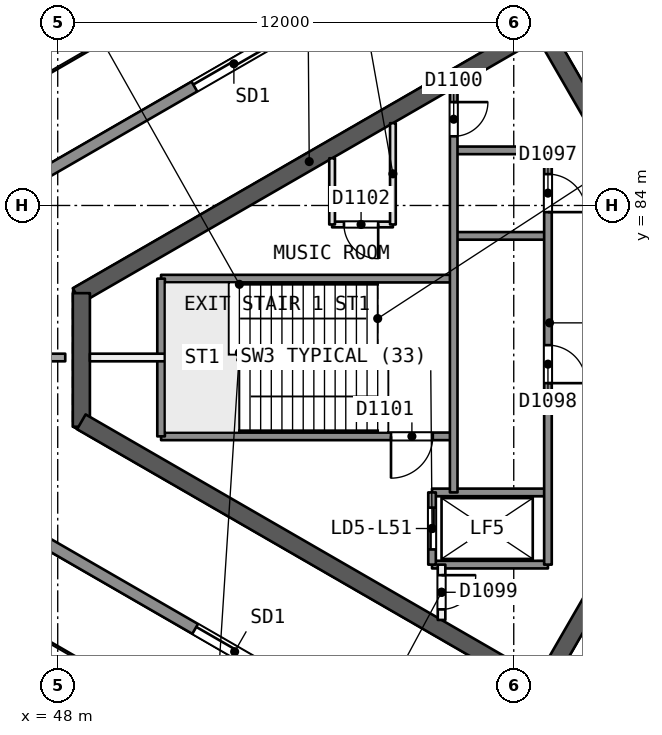
"""IFC4 building model, lengths in metres.
Left out: names, types, materials, properties, quantities, classifications, styles, units other than length and angle.
Written with IfcOpenShell. Run it as: python <this file> out.ifc"""

import sys

from ifc_helpers import new_model, si_unit, direction, frame, frame_2d, origin, place, context, subcontext, project, spatial, rectangle, extrude, element, fill, save


model = new_model("IFC4")
c1 = context("Model", 3, precision=1e-05, world=origin(), true_north=direction((0.0, 1.0)))
c2 = subcontext(c1, "Body", "Model", "MODEL_VIEW")
j1 = project(units=[si_unit("LENGTHUNIT", "METRE"), si_unit("PLANEANGLEUNIT", "RADIAN")], contexts=[c1])
p1 = place(None, origin())
s1 = spatial("IfcSite", under=j1, at=p1, CompositionType="ELEMENT")
p2 = place(p1, origin())
s2 = spatial("IfcBuilding", under=s1, at=p2, CompositionType="ELEMENT")
p3 = place(p2, frame((0.0, 0.0, 209.5)))
s3 = spatial("IfcBuildingStorey", under=s2, at=p3, CompositionType="ELEMENT", Elevation=209.5)
p4 = place(p3, frame((65.74, 80.0, 0.0), z_axis=(0.0, 0.0, 1.0), x_axis=(-0.499991857942, 0.866030104553, 0.0)))
e1 = element("IfcWall", 1, at=p4, inside=s3, PredefinedType="SHEAR", context=c2, shape_type="SweptSolid", body=[
    extrude(rectangle(XDim=10.25, YDim=0.45, at=frame_2d((5.125, 0.0))), origin(), (0.0, 0.0, 1.0), 3.7),
])
p5 = place(p4, frame((0.82, 0.0, 0.0)))
e2 = element("IfcOpeningElement", 2, at=p5, cuts=e1, PredefinedType="OPENING", context=c2, shape_type="SweptSolid", body=[
    extrude(rectangle(XDim=1.2, YDim=2.1, at=frame_2d((0.6, 1.05))), frame((0.0, 0.235, 0.0), z_axis=(0.0, -1.0, 0.0), x_axis=(1.0, 0.0, 0.0)), (0.0, 0.0, 1.0), 0.471),
])
p6 = place(p3, frame((60.728, 88.682, 0.0), z_axis=(0.0, 0.0, 1.0), x_axis=(-0.866021613849, -0.500006564303, 0.0)))
e3 = element("IfcWall", 3, at=p6, inside=s3, PredefinedType="SHEAR", context=c2, shape_type="SweptSolid", body=[
    extrude(rectangle(XDim=14.108, YDim=0.45, at=frame_2d((7.054, 0.0))), origin(), (0.0, 0.0, 1.0), 3.7),
])
p7 = place(p3, frame((48.622, 81.693, 0.0), z_axis=(0.0, 0.0, 1.0), x_axis=(0.0, -1.0, 0.0)))
e4 = element("IfcWall", 4, at=p7, inside=s3, PredefinedType="SHEAR", context=c2, shape_type="SweptSolid", body=[
    extrude(rectangle(XDim=3.515, YDim=0.45, at=frame_2d((1.758, 0.0))), origin(), (0.0, 0.0, 1.0), 3.7),
])
p8 = place(p3, frame((48.622, 78.307, 0.0), z_axis=(0.0, 0.0, 1.0), x_axis=(0.86602701116, -0.499997215934, 0.0)))
e5 = element("IfcWall", 5, at=p8, inside=s3, PredefinedType="SHEAR", context=c2, shape_type="SweptSolid", body=[
    extrude(rectangle(XDim=14.204, YDim=0.45, at=frame_2d((7.102, 0.0))), origin(), (0.0, 0.0, 1.0), 3.7),
])
p9 = place(p3, frame((60.728, 71.318, 0.0), z_axis=(0.0, 0.0, 1.0), x_axis=(0.500012416173, 0.866018235185, 0.0)))
e6 = element("IfcWall", 6, at=p9, inside=s3, PredefinedType="SHEAR", context=c2, shape_type="SweptSolid", body=[
    extrude(rectangle(XDim=10.155, YDim=0.45, at=frame_2d((5.078, 0.0))), origin(), (0.0, 0.0, 1.0), 3.7),
])
p10 = place(p9, frame((8.005, 0.0, 0.0)))
e7 = element("IfcOpeningElement", 7, at=p10, cuts=e6, PredefinedType="OPENING", context=c2, shape_type="SweptSolid", body=[
    extrude(rectangle(XDim=1.2, YDim=2.1, at=frame_2d((0.6, 1.05))), frame((0.0, 0.235, 0.0), z_axis=(0.0, -1.0, 0.0), x_axis=(1.0, 0.0, 0.0)), (0.0, 0.0, 1.0), 0.471),
])
p11 = place(p3, frame((43.951, 80.0, 0.0), z_axis=(0.0, 0.0, 1.0), x_axis=(1.0, 0.0, 0.0)))
e8 = element("IfcWall", 8, at=p11, inside=s3, PredefinedType="PARTITIONING", context=c2, shape_type="SweptSolid", body=[
    extrude(rectangle(XDim=4.247, YDim=0.2, at=frame_2d((2.123, 0.0))), origin(), (0.0, 0.0, 1.0), 3.3),
])
p12 = place(p3, frame((43.802, 82.63, 0.0), z_axis=(0.0, 0.0, 1.0), x_axis=(0.866026224187, 0.499998579018, 0.0)))
e9 = element("IfcWall", 9, at=p12, inside=s3, PredefinedType="SOLIDWALL", context=c2, shape_type="SweptSolid", body=[
    extrude(rectangle(XDim=51.406, YDim=0.3, at=frame_2d((25.703, 0.0))), origin(), (0.0, 0.0, 1.0), 3.3),
])
p13 = place(p12, frame((24.503, 0.0, 0.0)))
e10 = element("IfcOpeningElement", 10, at=p13, cuts=e9, PredefinedType="OPENING", context=c2, shape_type="SweptSolid", body=[
    extrude(rectangle(XDim=2.4, YDim=2.4, at=frame_2d((1.2, 1.2))), frame((0.0, 0.161, 0.0), z_axis=(0.0, -1.0, 0.0), x_axis=(1.0, 0.0, 0.0)), (0.0, 0.0, 1.0), 0.321),
])
p14 = place(p12, frame((30.271, 0.0, 0.0)))
e11 = element("IfcOpeningElement", 11, at=p14, cuts=e9, PredefinedType="OPENING", context=c2, shape_type="SweptSolid", body=[
    extrude(rectangle(XDim=2.4, YDim=2.4, at=frame_2d((1.2, 1.2))), frame((0.0, 0.161, 0.0), z_axis=(0.0, -1.0, 0.0), x_axis=(1.0, 0.0, 0.0)), (0.0, 0.0, 1.0), 0.321),
])
p15 = place(p12, frame((39.983, 0.0, 0.0)))
e12 = element("IfcOpeningElement", 12, at=p15, cuts=e9, PredefinedType="OPENING", context=c2, shape_type="SweptSolid", body=[
    extrude(rectangle(XDim=2.4, YDim=2.4, at=frame_2d((1.2, 1.2))), frame((0.0, 0.161, 0.0), z_axis=(0.0, -1.0, 0.0), x_axis=(1.0, 0.0, 0.0)), (0.0, 0.0, 1.0), 0.321),
])
p16 = place(p12, frame((18.736, 0.0, 0.0)))
e13 = element("IfcOpeningElement", 13, at=p16, cuts=e9, PredefinedType="OPENING", context=c2, shape_type="SweptSolid", body=[
    extrude(rectangle(XDim=2.4, YDim=2.4, at=frame_2d((1.2, 1.2))), frame((0.0, 0.161, 0.0), z_axis=(0.0, -1.0, 0.0), x_axis=(1.0, 0.0, 0.0)), (0.0, 0.0, 1.0), 0.321),
])
p17 = place(p12, frame((9.0, 0.0, 0.0)))
e14 = element("IfcOpeningElement", 14, at=p17, cuts=e9, PredefinedType="OPENING", context=c2, shape_type="SweptSolid", body=[
    extrude(rectangle(XDim=2.4, YDim=2.4, at=frame_2d((1.2, 1.2))), frame((0.0, 0.161, 0.0), z_axis=(0.0, -1.0, 0.0), x_axis=(1.0, 0.0, 0.0)), (0.0, 0.0, 1.0), 0.321),
])
p18 = place(p3, frame((88.322, 51.667, 0.0), z_axis=(0.0, 0.0, 1.0), x_axis=(-0.866026224187, 0.499998579018, 0.0)))
e15 = element("IfcWall", 15, at=p18, inside=s3, PredefinedType="SOLIDWALL", context=c2, shape_type="SweptSolid", body=[
    extrude(rectangle(XDim=51.406, YDim=0.3, at=frame_2d((25.703, 0.0))), origin(), (0.0, 0.0, 1.0), 3.3),
])
p19 = place(p18, frame((29.803, 0.0, 0.0)))
e16 = element("IfcOpeningElement", 16, at=p19, cuts=e15, PredefinedType="OPENING", context=c2, shape_type="SweptSolid", body=[
    extrude(rectangle(XDim=2.4, YDim=2.4, at=frame_2d((1.2, 1.2))), frame((0.0, 0.161, 0.0), z_axis=(0.0, -1.0, 0.0), x_axis=(1.0, 0.0, 0.0)), (0.0, 0.0, 1.0), 0.321),
])
p20 = place(p18, frame((39.983, 0.0, 0.0)))
e17 = element("IfcOpeningElement", 17, at=p20, cuts=e15, PredefinedType="OPENING", context=c2, shape_type="SweptSolid", body=[
    extrude(rectangle(XDim=2.4, YDim=2.4, at=frame_2d((1.2, 1.2))), frame((0.0, 0.161, 0.0), z_axis=(0.0, -1.0, 0.0), x_axis=(1.0, 0.0, 0.0)), (0.0, 0.0, 1.0), 0.321),
])
p21 = place(p18, frame((19.827, 0.0, 0.0)))
e18 = element("IfcOpeningElement", 18, at=p21, cuts=e15, PredefinedType="OPENING", context=c2, shape_type="SweptSolid", body=[
    extrude(rectangle(XDim=2.4, YDim=2.4, at=frame_2d((1.2, 1.2))), frame((0.0, 0.161, 0.0), z_axis=(0.0, -1.0, 0.0), x_axis=(1.0, 0.0, 0.0)), (0.0, 0.0, 1.0), 0.321),
])
p22 = place(p18, frame((9.0, 0.0, 0.0)))
e19 = element("IfcOpeningElement", 19, at=p22, cuts=e15, PredefinedType="OPENING", context=c2, shape_type="SweptSolid", body=[
    extrude(rectangle(XDim=2.4, YDim=2.4, at=frame_2d((1.2, 1.2))), frame((0.0, 0.161, 0.0), z_axis=(0.0, -1.0, 0.0), x_axis=(1.0, 0.0, 0.0)), (0.0, 0.0, 1.0), 0.321),
])
p23 = place(p18, frame((25.427, 0.0, 0.9)))
e20 = element("IfcOpeningElement", 20, at=p23, cuts=e15, PredefinedType="OPENING", context=c2, shape_type="SweptSolid", body=[
    extrude(rectangle(XDim=1.8, YDim=1.5, at=frame_2d((0.9, 0.75))), frame((0.0, 0.161, 0.0), z_axis=(0.0, -1.0, 0.0), x_axis=(1.0, 0.0, 0.0)), (0.0, 0.0, 1.0), 0.321),
])
p24 = place(p3, frame((60.9, 85.45, 0.0), z_axis=(0.0, 0.0, 1.0), x_axis=(-1.0, 0.0, 0.0)))
e21 = element("IfcWall", 21, at=p24, inside=s3, PredefinedType="SOLIDWALL", context=c2, shape_type="SweptSolid", body=[
    extrude(rectangle(XDim=2.48, YDim=0.2, at=frame_2d((1.24, 0.0))), origin(), (0.0, 0.0, 1.0), 3.3),
])
p25 = place(p3, frame((56.82, 83.5, 0.0), z_axis=(0.0, 0.0, 1.0), x_axis=(-1.0, 0.0, 0.0)))
e22 = element("IfcWall", 22, at=p25, inside=s3, PredefinedType="PARTITIONING", context=c2, shape_type="SweptSolid", body=[
    extrude(rectangle(XDim=1.6, YDim=0.15, at=frame_2d((0.8, 0.0))), origin(), (0.0, 0.0, 1.0), 3.3),
])
p26 = place(p25, frame((0.387, 0.0, 0.0)))
e23 = element("IfcOpeningElement", 23, at=p26, cuts=e22, PredefinedType="OPENING", context=c2, shape_type="SweptSolid", body=[
    extrude(rectangle(XDim=0.9, YDim=2.1, at=frame_2d((0.45, 1.05))), frame((0.0, 0.085, 0.0), z_axis=(0.0, -1.0, 0.0), x_axis=(1.0, 0.0, 0.0)), (0.0, 0.0, 1.0), 0.171),
])
p27 = place(p3, frame((60.9, 83.2, 0.0), z_axis=(0.0, 0.0, 1.0), x_axis=(-1.0, 0.0, 0.0)))
e24 = element("IfcWall", 24, at=p27, inside=s3, PredefinedType="SOLIDWALL", context=c2, shape_type="SweptSolid", body=[
    extrude(rectangle(XDim=2.48, YDim=0.2, at=frame_2d((1.24, 0.0))), origin(), (0.0, 0.0, 1.0), 3.3),
])
p28 = place(p3, frame((58.42, 82.075, 0.0), z_axis=(0.0, 0.0, 1.0), x_axis=(-1.0, 0.0, 0.0)))
e25 = element("IfcWall", 25, at=p28, inside=s3, PredefinedType="SOLIDWALL", context=c2, shape_type="SweptSolid", body=[
    extrude(rectangle(XDim=7.7, YDim=0.2, at=frame_2d((3.85, 0.0))), origin(), (0.0, 0.0, 1.0), 3.3),
])
p29 = place(p3, frame((50.82, 80.0, 0.0), z_axis=(0.0, 0.0, 1.0), x_axis=(-1.0, 0.0, 0.0)))
e26 = element("IfcWall", 26, at=p29, inside=s3, PredefinedType="PARTITIONING", context=c2, shape_type="SweptSolid", body=[
    extrude(rectangle(XDim=1.973, YDim=0.2, at=frame_2d((0.987, 0.0))), origin(), (0.0, 0.0, 1.0), 3.3),
])
p30 = place(p3, frame((58.42, 77.925, 0.0), z_axis=(0.0, 0.0, 1.0), x_axis=(-1.0, 0.0, 0.0)))
e27 = element("IfcWall", 27, at=p30, inside=s3, PredefinedType="SOLIDWALL", context=c2, shape_type="SweptSolid", body=[
    extrude(rectangle(XDim=7.7, YDim=0.2, at=frame_2d((3.85, 0.0))), origin(), (0.0, 0.0, 1.0), 3.3),
])
p31 = place(p30, frame((0.55, 0.0, 0.0)))
e28 = element("IfcOpeningElement", 28, at=p31, cuts=e27, PredefinedType="OPENING", context=c2, shape_type="SweptSolid", body=[
    extrude(rectangle(XDim=1.1, YDim=2.1, at=frame_2d((0.55, 1.05))), frame((0.0, 0.11, 0.0), z_axis=(0.0, -1.0, 0.0), x_axis=(1.0, 0.0, 0.0)), (0.0, 0.0, 1.0), 0.221),
])
for number, where, z_axis, x_axis in (
    (29, (60.9, 76.45, 0.0), (0.0, 0.0, 1.0), (-1.0, 0.0, 0.0)),
    (30, (60.9, 74.55, 0.0), (0.0, 0.0, 1.0), (-1.0, 0.0, 0.0)),
):
    element("IfcWall", number, at=place(p3, frame(where, z_axis=z_axis, x_axis=x_axis)), inside=s3, PredefinedType="SOLIDWALL", context=c2, shape_type="SweptSolid", body=[
        extrude(rectangle(XDim=3.05, YDim=0.2, at=frame_2d((1.525, 0.0))), origin(), (0.0, 0.0, 1.0), 3.3),
    ])
p32 = place(p3, frame((60.9, 85.45, 0.0), z_axis=(0.0, 0.0, 1.0), x_axis=(0.0, -1.0, 0.0)))
e31 = element("IfcWall", 31, at=p32, inside=s3, PredefinedType="SOLIDWALL", context=c2, shape_type="SweptSolid", body=[
    extrude(rectangle(XDim=10.9, YDim=0.2, at=frame_2d((5.45, 0.0))), origin(), (0.0, 0.0, 1.0), 3.3),
])
p33 = place(p32, frame((0.625, 0.0, 0.0)))
e32 = element("IfcOpeningElement", 32, at=p33, cuts=e31, PredefinedType="OPENING", context=c2, shape_type="SweptSolid", body=[
    extrude(rectangle(XDim=1.0, YDim=2.1, at=frame_2d((0.5, 1.05))), frame((0.0, 0.11, 0.0), z_axis=(0.0, -1.0, 0.0), x_axis=(1.0, 0.0, 0.0)), (0.0, 0.0, 1.0), 0.221),
])
p34 = place(p32, frame((5.125, 0.0, 0.0)))
e33 = element("IfcOpeningElement", 33, at=p34, cuts=e31, PredefinedType="OPENING", context=c2, shape_type="SweptSolid", body=[
    extrude(rectangle(XDim=1.0, YDim=2.1, at=frame_2d((0.5, 1.05))), frame((0.0, 0.11, 0.0), z_axis=(0.0, -1.0, 0.0), x_axis=(1.0, 0.0, 0.0)), (0.0, 0.0, 1.0), 0.221),
])
p35 = place(p3, frame((58.42, 87.09, 0.0), z_axis=(0.0, 0.0, 1.0), x_axis=(0.0, -1.0, 0.0)))
e34 = element("IfcWall", 34, at=p35, inside=s3, PredefinedType="SOLIDWALL", context=c2, shape_type="SweptSolid", body=[
    extrude(rectangle(XDim=10.64, YDim=0.2, at=frame_2d((5.32, 0.0))), origin(), (0.0, 0.0, 1.0), 3.3),
])
p36 = place(p35, frame((0.37, 0.0, 0.0)))
e35 = element("IfcOpeningElement", 35, at=p36, cuts=e34, PredefinedType="OPENING", context=c2, shape_type="SweptSolid", body=[
    extrude(rectangle(XDim=0.9, YDim=2.1, at=frame_2d((0.45, 1.05))), frame((0.0, 0.11, 0.0), z_axis=(0.0, -1.0, 0.0), x_axis=(1.0, 0.0, 0.0)), (0.0, 0.0, 1.0), 0.221),
])
p37 = place(p3, frame((58.1, 74.55, 0.0), z_axis=(0.0, 0.0, 1.0), x_axis=(0.0, -1.0, 0.0)))
e36 = element("IfcWall", 36, at=p37, inside=s3, PredefinedType="PARTITIONING", context=c2, shape_type="SweptSolid", body=[
    extrude(rectangle(XDim=1.455, YDim=0.2, at=frame_2d((0.728, 0.0))), origin(), (0.0, 0.0, 1.0), 3.3),
])
p38 = place(p37, frame((0.278, 0.0, 0.0)))
e37 = element("IfcOpeningElement", 37, at=p38, cuts=e36, PredefinedType="OPENING", context=c2, shape_type="SweptSolid", body=[
    extrude(rectangle(XDim=0.9, YDim=2.1, at=frame_2d((0.45, 1.05))), frame((0.0, 0.11, 0.0), z_axis=(0.0, -1.0, 0.0), x_axis=(1.0, 0.0, 0.0)), (0.0, 0.0, 1.0), 0.221),
])
p39 = place(p3, frame((57.85, 76.45, 0.0), z_axis=(0.0, 0.0, 1.0), x_axis=(0.0, -1.0, 0.0)))
e38 = element("IfcWall", 38, at=p39, inside=s3, PredefinedType="SOLIDWALL", context=c2, shape_type="SweptSolid", body=[
    extrude(rectangle(XDim=1.9, YDim=0.2, at=frame_2d((0.95, 0.0))), origin(), (0.0, 0.0, 1.0), 3.3),
])
p40 = place(p39, frame((0.4, 0.0, 0.0)))
e39 = element("IfcOpeningElement", 39, at=p40, cuts=e38, PredefinedType="OPENING", context=c2, shape_type="SweptSolid", body=[
    extrude(rectangle(XDim=1.1, YDim=2.1, at=frame_2d((0.55, 1.05))), frame((0.0, 0.11, 0.0), z_axis=(0.0, -1.0, 0.0), x_axis=(1.0, 0.0, 0.0)), (0.0, 0.0, 1.0), 0.221),
])
p41 = place(p3, frame((56.82, 86.166, 0.0), z_axis=(0.0, 0.0, 1.0), x_axis=(0.0, -1.0, 0.0)))
e40 = element("IfcWall", 40, at=p41, inside=s3, PredefinedType="PARTITIONING", context=c2, shape_type="SweptSolid", body=[
    extrude(rectangle(XDim=2.666, YDim=0.15, at=frame_2d((1.333, 0.0))), origin(), (0.0, 0.0, 1.0), 3.3),
])
p42 = place(p3, frame((55.22, 85.242, 0.0), z_axis=(0.0, 0.0, 1.0), x_axis=(0.0, -1.0, 0.0)))
e41 = element("IfcWall", 41, at=p42, inside=s3, PredefinedType="PARTITIONING", context=c2, shape_type="SweptSolid", body=[
    extrude(rectangle(XDim=1.742, YDim=0.15, at=frame_2d((0.871, 0.0))), origin(), (0.0, 0.0, 1.0), 3.3),
])
p43 = place(p3, frame((50.72, 82.075, 0.0), z_axis=(0.0, 0.0, 1.0), x_axis=(0.0, -1.0, 0.0)))
e42 = element("IfcWall", 42, at=p43, inside=s3, PredefinedType="SOLIDWALL", context=c2, shape_type="SweptSolid", body=[
    extrude(rectangle(XDim=4.15, YDim=0.2, at=frame_2d((2.075, 0.0))), origin(), (0.0, 0.0, 1.0), 3.3),
])
p44 = place(p17, origin())
e43 = element("IfcDoor", 43, at=p44, inside=s3, OperationType="SLIDING_TO_LEFT", PredefinedType="NOTDEFINED", context=c2, shape_type="SweptSolid", body=[
    extrude(rectangle(XDim=2.4, YDim=2.4, at=frame_2d((1.2, 1.2))), frame((0.0, 0.025, 0.0), z_axis=(0.0, -1.0, 0.0), x_axis=(1.0, 0.0, 0.0)), (0.0, 0.0, 1.0), 0.05),
])
fill(e14, e43)
p45 = place(p20, origin())
e44 = element("IfcDoor", 44, at=p45, inside=s3, OperationType="SLIDING_TO_RIGHT", PredefinedType="NOTDEFINED", context=c2, shape_type="SweptSolid", body=[
    extrude(rectangle(XDim=2.4, YDim=2.4, at=frame_2d((1.2, 1.2))), frame((0.0, 0.025, 0.0), z_axis=(0.0, -1.0, 0.0), x_axis=(1.0, 0.0, 0.0)), (0.0, 0.0, 1.0), 0.05),
])
fill(e17, e44)
p46 = place(p40, origin())
e45 = element("IfcDoor", 45, at=p46, inside=s3, OperationType="SLIDING_TO_RIGHT", PredefinedType="NOTDEFINED", context=c2, shape_type="SweptSolid", body=[
    extrude(rectangle(XDim=1.1, YDim=2.1, at=frame_2d((0.55, 1.05))), frame((0.0, 0.025, 0.0), z_axis=(0.0, -1.0, 0.0), x_axis=(1.0, 0.0, 0.0)), (0.0, 0.0, 1.0), 0.05),
])
fill(e39, e45)
p47 = place(p33, origin())
e46 = element("IfcDoor", 46, at=p47, inside=s3, OperationType="SINGLE_SWING_RIGHT", PredefinedType="NOTDEFINED", context=c2, shape_type="SweptSolid", body=[
    extrude(rectangle(XDim=1.0, YDim=2.1, at=frame_2d((0.5, 1.05))), frame((0.0, 0.025, 0.0), z_axis=(0.0, -1.0, 0.0), x_axis=(1.0, 0.0, 0.0)), (0.0, 0.0, 1.0), 0.05),
])
fill(e32, e46)
p48 = place(p34, origin())
e47 = element("IfcDoor", 47, at=p48, inside=s3, OperationType="SINGLE_SWING_RIGHT", PredefinedType="NOTDEFINED", context=c2, shape_type="SweptSolid", body=[
    extrude(rectangle(XDim=1.0, YDim=2.1, at=frame_2d((0.5, 1.05))), frame((0.0, 0.025, 0.0), z_axis=(0.0, -1.0, 0.0), x_axis=(1.0, 0.0, 0.0)), (0.0, 0.0, 1.0), 0.05),
])
fill(e33, e47)
p49 = place(p38, origin())
e48 = element("IfcDoor", 48, at=p49, inside=s3, OperationType="SINGLE_SWING_LEFT", PredefinedType="NOTDEFINED", context=c2, shape_type="SweptSolid", body=[
    extrude(rectangle(XDim=0.9, YDim=2.1, at=frame_2d((0.45, 1.05))), frame((0.0, 0.025, 0.0), z_axis=(0.0, -1.0, 0.0), x_axis=(1.0, 0.0, 0.0)), (0.0, 0.0, 1.0), 0.05),
])
fill(e37, e48)
p50 = place(p36, origin())
e49 = element("IfcDoor", 49, at=p50, inside=s3, OperationType="SINGLE_SWING_LEFT", PredefinedType="NOTDEFINED", context=c2, shape_type="SweptSolid", body=[
    extrude(rectangle(XDim=0.9, YDim=2.1, at=frame_2d((0.45, 1.05))), frame((0.0, 0.025, 0.0), z_axis=(0.0, -1.0, 0.0), x_axis=(1.0, 0.0, 0.0)), (0.0, 0.0, 1.0), 0.05),
])
fill(e35, e49)
p51 = place(p31, origin())
e50 = element("IfcDoor", 50, at=p51, inside=s3, OperationType="SINGLE_SWING_RIGHT", PredefinedType="NOTDEFINED", context=c2, shape_type="SweptSolid", body=[
    extrude(rectangle(XDim=1.1, YDim=2.1, at=frame_2d((0.55, 1.05))), frame((0.0, 0.025, 0.0), z_axis=(0.0, -1.0, 0.0), x_axis=(1.0, 0.0, 0.0)), (0.0, 0.0, 1.0), 0.05),
])
fill(e28, e50)
p52 = place(p26, origin())
e51 = element("IfcDoor", 51, at=p52, inside=s3, OperationType="SINGLE_SWING_LEFT", PredefinedType="NOTDEFINED", context=c2, shape_type="SweptSolid", body=[
    extrude(rectangle(XDim=0.9, YDim=2.1, at=frame_2d((0.45, 1.05))), frame((0.0, 0.025, 0.0), z_axis=(0.0, -1.0, 0.0), x_axis=(1.0, 0.0, 0.0)), (0.0, 0.0, 1.0), 0.05),
])
fill(e23, e51)
save(model, sys.argv[1])
